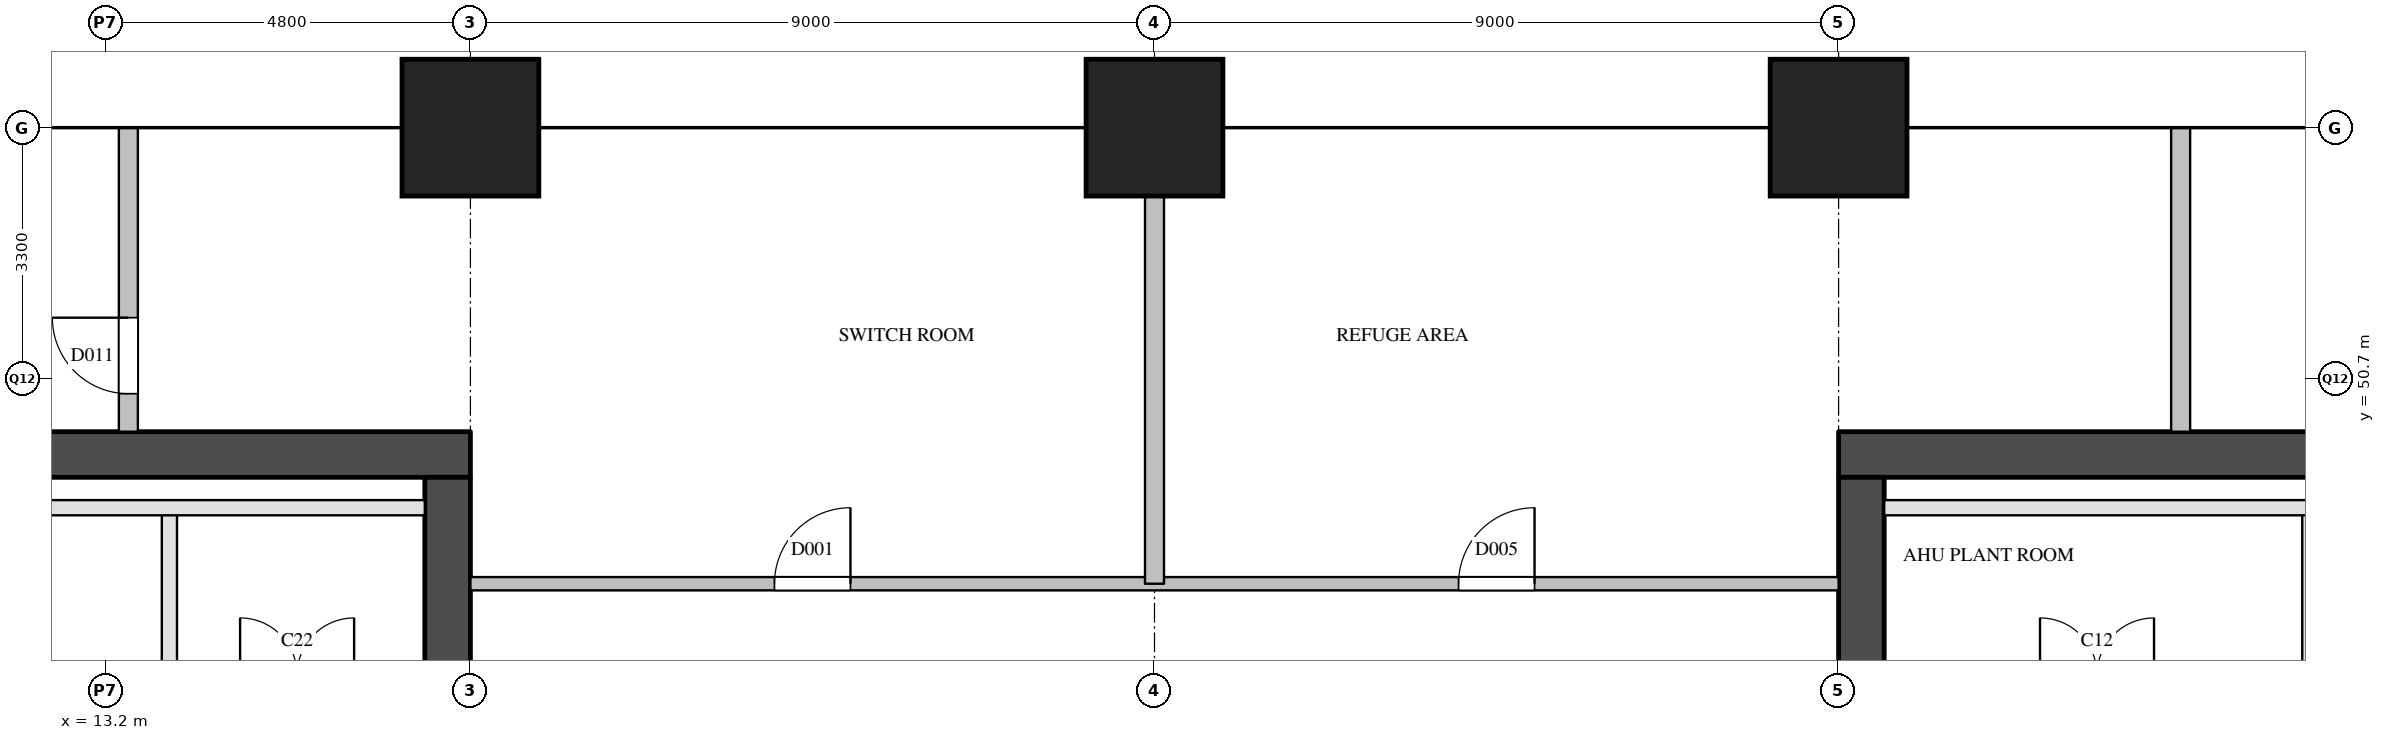
"""IFC4 building model, lengths in metres.
Left out: names, types, materials, properties, quantities, classifications, styles, units other than length and angle.
Written with IfcOpenShell. Run it as: python <this file> out.ifc"""

import sys

from ifc_helpers import new_model, si_unit, direction, frame, frame_2d, origin, origin_2d, place, context, subcontext, project, spatial, rectangle, extrude, element, fill, save


model = new_model("IFC4")
c1 = context("Model", 3, precision=1e-05, world=origin(), true_north=direction((0.0, 1.0)))
c2 = subcontext(c1, "Body", "Model", "MODEL_VIEW")
j1 = project(units=[si_unit("LENGTHUNIT", "METRE"), si_unit("PLANEANGLEUNIT", "RADIAN")], contexts=[c1])
p1 = place(None, origin())
s1 = spatial("IfcSite", under=j1, at=p1, CompositionType="ELEMENT")
p2 = place(p1, origin())
s2 = spatial("IfcBuilding", under=s1, at=p2, CompositionType="ELEMENT")
p3 = place(p2, frame((0.0, 0.0, 123.4)))
s3 = spatial("IfcBuildingStorey", under=s2, at=p3, CompositionType="ELEMENT", Elevation=123.4)
for number, where, z_axis, x_axis in (
    (1, (18.0, 54.0, 0.0), (0.0, 0.0, 1.0), (1.0, 0.0, 0.0)),
    (2, (27.0, 54.0, 0.0), (0.0, 0.0, 1.0), (1.0, 0.0, 0.0)),
    (3, (36.0, 54.0, 0.0), (0.0, 0.0, 1.0), (1.0, 0.0, 0.0)),
):
    element("IfcColumn", number, at=place(p3, frame(where, z_axis=z_axis, x_axis=x_axis)), inside=s3, PredefinedType="COLUMN", context=c2, shape_type="SweptSolid", body=[
        extrude(rectangle(XDim=1.8, YDim=1.8, at=origin_2d()), origin(), (0.0, 0.0, 1.0), 6.0),
    ])
p4 = place(p3, frame((36.0, 49.7, 0.0), z_axis=(0.0, 0.0, 1.0), x_axis=(1.0, 0.0, 0.0)))
e4 = element("IfcWall", 4, at=p4, inside=s3, PredefinedType="SHEAR", context=c2, shape_type="SweptSolid", body=[
    extrude(rectangle(XDim=12.4, YDim=0.6, at=frame_2d((6.2, 0.0))), origin(), (0.0, 0.0, 1.0), 5.7),
])
p5 = place(p3, frame((36.3, 29.1, 0.0), z_axis=(0.0, 0.0, 1.0), x_axis=(0.0, 1.0, 0.0)))
e5 = element("IfcWall", 5, at=p5, inside=s3, PredefinedType="SHEAR", context=c2, shape_type="SweptSolid", body=[
    extrude(rectangle(XDim=20.3, YDim=0.6, at=frame_2d((10.15, 0.0))), origin(), (0.0, 0.0, 1.0), 5.7),
])
p6 = place(p5, frame((3.6, 0.0, 0.0)))
e6 = element("IfcOpeningElement", 6, at=p6, cuts=e5, PredefinedType="OPENING", context=c2, shape_type="SweptSolid", body=[
    extrude(rectangle(XDim=1.8, YDim=2.1, at=frame_2d((0.9, 1.05))), frame((0.0, 0.31, 0.0), z_axis=(0.0, -1.0, 0.0), x_axis=(1.0, 0.0, 0.0)), (0.0, 0.0, 1.0), 0.62),
])
p7 = place(p5, frame((16.4, 0.0, 0.0)))
e7 = element("IfcOpeningElement", 7, at=p7, cuts=e5, PredefinedType="OPENING", context=c2, shape_type="SweptSolid", body=[
    extrude(rectangle(XDim=1.0, YDim=2.1, at=frame_2d((0.5, 1.05))), frame((0.0, 0.31, 0.0), z_axis=(0.0, -1.0, 0.0), x_axis=(1.0, 0.0, 0.0)), (0.0, 0.0, 1.0), 0.62),
])
p8 = place(p3, frame((42.2, 46.8, 0.0), z_axis=(0.0, 0.0, 1.0), x_axis=(0.0, 1.0, 0.0)))
e8 = element("IfcWall", 8, at=p8, inside=s3, PredefinedType="PARTITIONING", context=c2, shape_type="SweptSolid", body=[
    extrude(rectangle(XDim=2.2, YDim=0.2, at=frame_2d((1.1, 0.0))), origin(), (0.0, 0.0, 1.0), 5.7),
])
p9 = place(p3, frame((36.6, 49.0, 0.0), z_axis=(0.0, 0.0, 1.0), x_axis=(1.0, 0.0, 0.0)))
e9 = element("IfcWall", 9, at=p9, inside=s3, PredefinedType="PARTITIONING", context=c2, shape_type="SweptSolid", body=[
    extrude(rectangle(XDim=11.2, YDim=0.2, at=frame_2d((5.6, 0.0))), origin(), (0.0, 0.0, 1.0), 5.7),
])
p10 = place(p3, frame((5.6, 49.7, 0.0), z_axis=(0.0, 0.0, 1.0), x_axis=(1.0, 0.0, 0.0)))
e10 = element("IfcWall", 10, at=p10, inside=s3, PredefinedType="SHEAR", context=c2, shape_type="SweptSolid", body=[
    extrude(rectangle(XDim=12.4, YDim=0.6, at=frame_2d((6.2, 0.0))), origin(), (0.0, 0.0, 1.0), 5.7),
])
p11 = place(p3, frame((17.7, 29.1, 0.0), z_axis=(0.0, 0.0, 1.0), x_axis=(0.0, 1.0, 0.0)))
e11 = element("IfcWall", 11, at=p11, inside=s3, PredefinedType="SHEAR", context=c2, shape_type="SweptSolid", body=[
    extrude(rectangle(XDim=20.3, YDim=0.6, at=frame_2d((10.15, 0.0))), origin(), (0.0, 0.0, 1.0), 5.7),
])
p12 = place(p11, frame((1.25, 0.0, 0.0)))
e12 = element("IfcOpeningElement", 12, at=p12, cuts=e11, PredefinedType="OPENING", context=c2, shape_type="SweptSolid", body=[
    extrude(rectangle(XDim=0.7, YDim=2.1, at=frame_2d((0.35, 1.05))), frame((0.0, 0.31, 0.0), z_axis=(0.0, -1.0, 0.0), x_axis=(1.0, 0.0, 0.0)), (0.0, 0.0, 1.0), 0.62),
])
p13 = place(p11, frame((7.05, 0.0, 0.0)))
e13 = element("IfcOpeningElement", 13, at=p13, cuts=e11, PredefinedType="OPENING", context=c2, shape_type="SweptSolid", body=[
    extrude(rectangle(XDim=0.7, YDim=2.1, at=frame_2d((0.35, 1.05))), frame((0.0, 0.31, 0.0), z_axis=(0.0, -1.0, 0.0), x_axis=(1.0, 0.0, 0.0)), (0.0, 0.0, 1.0), 0.62),
])
p14 = place(p11, frame((16.4, 0.0, 0.0)))
e14 = element("IfcOpeningElement", 14, at=p14, cuts=e11, PredefinedType="OPENING", context=c2, shape_type="SweptSolid", body=[
    extrude(rectangle(XDim=1.0, YDim=2.1, at=frame_2d((0.5, 1.05))), frame((0.0, 0.31, 0.0), z_axis=(0.0, -1.0, 0.0), x_axis=(1.0, 0.0, 0.0)), (0.0, 0.0, 1.0), 0.62),
])
p15 = place(p3, frame((14.04, 46.8, 0.0), z_axis=(0.0, 0.0, 1.0), x_axis=(0.0, 1.0, 0.0)))
e15 = element("IfcWall", 15, at=p15, inside=s3, PredefinedType="PARTITIONING", context=c2, shape_type="SweptSolid", body=[
    extrude(rectangle(XDim=2.2, YDim=0.2, at=frame_2d((1.1, 0.0))), origin(), (0.0, 0.0, 1.0), 5.7),
])
p16 = place(p3, frame((6.2, 49.0, 0.0), z_axis=(0.0, 0.0, 1.0), x_axis=(1.0, 0.0, 0.0)))
e16 = element("IfcWall", 16, at=p16, inside=s3, PredefinedType="PARTITIONING", context=c2, shape_type="SweptSolid", body=[
    extrude(rectangle(XDim=11.2, YDim=0.2, at=frame_2d((5.6, 0.0))), origin(), (0.0, 0.0, 1.0), 5.7),
])
p17 = place(p3, frame((18.0, 48.0, 0.0), z_axis=(0.0, 0.0, 1.0), x_axis=(1.0, 0.0, 0.0)))
e17 = element("IfcWall", 17, at=p17, inside=s3, PredefinedType="PARTITIONING", context=c2, shape_type="SweptSolid", body=[
    extrude(rectangle(XDim=18.0, YDim=0.175, at=frame_2d((9.0, 0.0))), origin(), (0.0, 0.0, 1.0), 5.7),
])
p18 = place(p17, frame((4.0, 0.0, 0.0)))
e18 = element("IfcOpeningElement", 18, at=p18, cuts=e17, PredefinedType="OPENING", context=c2, shape_type="SweptSolid", body=[
    extrude(rectangle(XDim=1.0, YDim=2.1, at=frame_2d((0.5, 1.05))), frame((0.0, 0.097, 0.0), z_axis=(0.0, -1.0, 0.0), x_axis=(1.0, 0.0, 0.0)), (0.0, 0.0, 1.0), 0.195),
])
p19 = place(p17, frame((13.0, 0.0, 0.0)))
e19 = element("IfcOpeningElement", 19, at=p19, cuts=e17, PredefinedType="OPENING", context=c2, shape_type="SweptSolid", body=[
    extrude(rectangle(XDim=1.0, YDim=2.1, at=frame_2d((0.5, 1.05))), frame((0.0, 0.097, 0.0), z_axis=(0.0, -1.0, 0.0), x_axis=(1.0, 0.0, 0.0)), (0.0, 0.0, 1.0), 0.195),
])
p20 = place(p3, frame((13.5, 50.0, 0.0), z_axis=(0.0, 0.0, 1.0), x_axis=(0.0, 1.0, 0.0)))
e20 = element("IfcWall", 20, at=p20, inside=s3, PredefinedType="PARTITIONING", context=c2, shape_type="SweptSolid", body=[
    extrude(rectangle(XDim=4.0, YDim=0.25, at=frame_2d((2.0, 0.0))), origin(), (0.0, 0.0, 1.0), 5.7),
])
p21 = place(p20, frame((0.5, 0.0, 0.0)))
e21 = element("IfcOpeningElement", 21, at=p21, cuts=e20, PredefinedType="OPENING", context=c2, shape_type="SweptSolid", body=[
    extrude(rectangle(XDim=1.0, YDim=2.1, at=frame_2d((0.5, 1.05))), frame((0.0, 0.135, 0.0), z_axis=(0.0, -1.0, 0.0), x_axis=(1.0, 0.0, 0.0)), (0.0, 0.0, 1.0), 0.27),
])
p22 = place(p3, frame((27.0, 48.0, 0.0), z_axis=(0.0, 0.0, 1.0), x_axis=(0.0, 1.0, 0.0)))
e22 = element("IfcWall", 22, at=p22, inside=s3, PredefinedType="PARTITIONING", context=c2, shape_type="SweptSolid", body=[
    extrude(rectangle(XDim=6.0, YDim=0.25, at=frame_2d((3.0, 0.0))), origin(), (0.0, 0.0, 1.0), 5.7),
])
p23 = place(p3, frame((40.5, 50.0, 0.0), z_axis=(0.0, 0.0, 1.0), x_axis=(0.0, 1.0, 0.0)))
e23 = element("IfcWall", 23, at=p23, inside=s3, PredefinedType="PARTITIONING", context=c2, shape_type="SweptSolid", body=[
    extrude(rectangle(XDim=4.0, YDim=0.25, at=frame_2d((2.0, 0.0))), origin(), (0.0, 0.0, 1.0), 5.7),
])
p24 = place(p18, origin())
e24 = element("IfcDoor", 24, at=p24, inside=s3, OperationType="SINGLE_SWING_RIGHT", PredefinedType="DOOR", context=c2, shape_type="SweptSolid", body=[
    extrude(rectangle(XDim=1.0, YDim=2.1, at=frame_2d((0.5, 1.05))), frame((0.0, 0.025, 0.0), z_axis=(0.0, -1.0, 0.0), x_axis=(1.0, 0.0, 0.0)), (0.0, 0.0, 1.0), 0.05),
])
fill(e18, e24)
p25 = place(p19, origin())
e25 = element("IfcDoor", 25, at=p25, inside=s3, OperationType="SINGLE_SWING_RIGHT", PredefinedType="DOOR", context=c2, shape_type="SweptSolid", body=[
    extrude(rectangle(XDim=1.0, YDim=2.1, at=frame_2d((0.5, 1.05))), frame((0.0, 0.025, 0.0), z_axis=(0.0, -1.0, 0.0), x_axis=(1.0, 0.0, 0.0)), (0.0, 0.0, 1.0), 0.05),
])
fill(e19, e25)
p26 = place(p21, origin())
e26 = element("IfcDoor", 26, at=p26, inside=s3, OperationType="SINGLE_SWING_RIGHT", PredefinedType="DOOR", context=c2, shape_type="SweptSolid", body=[
    extrude(rectangle(XDim=1.0, YDim=2.1, at=frame_2d((0.5, 1.05))), frame((0.0, 0.025, 0.0), z_axis=(0.0, -1.0, 0.0), x_axis=(1.0, 0.0, 0.0)), (0.0, 0.0, 1.0), 0.05),
])
fill(e21, e26)
save(model, sys.argv[1])
